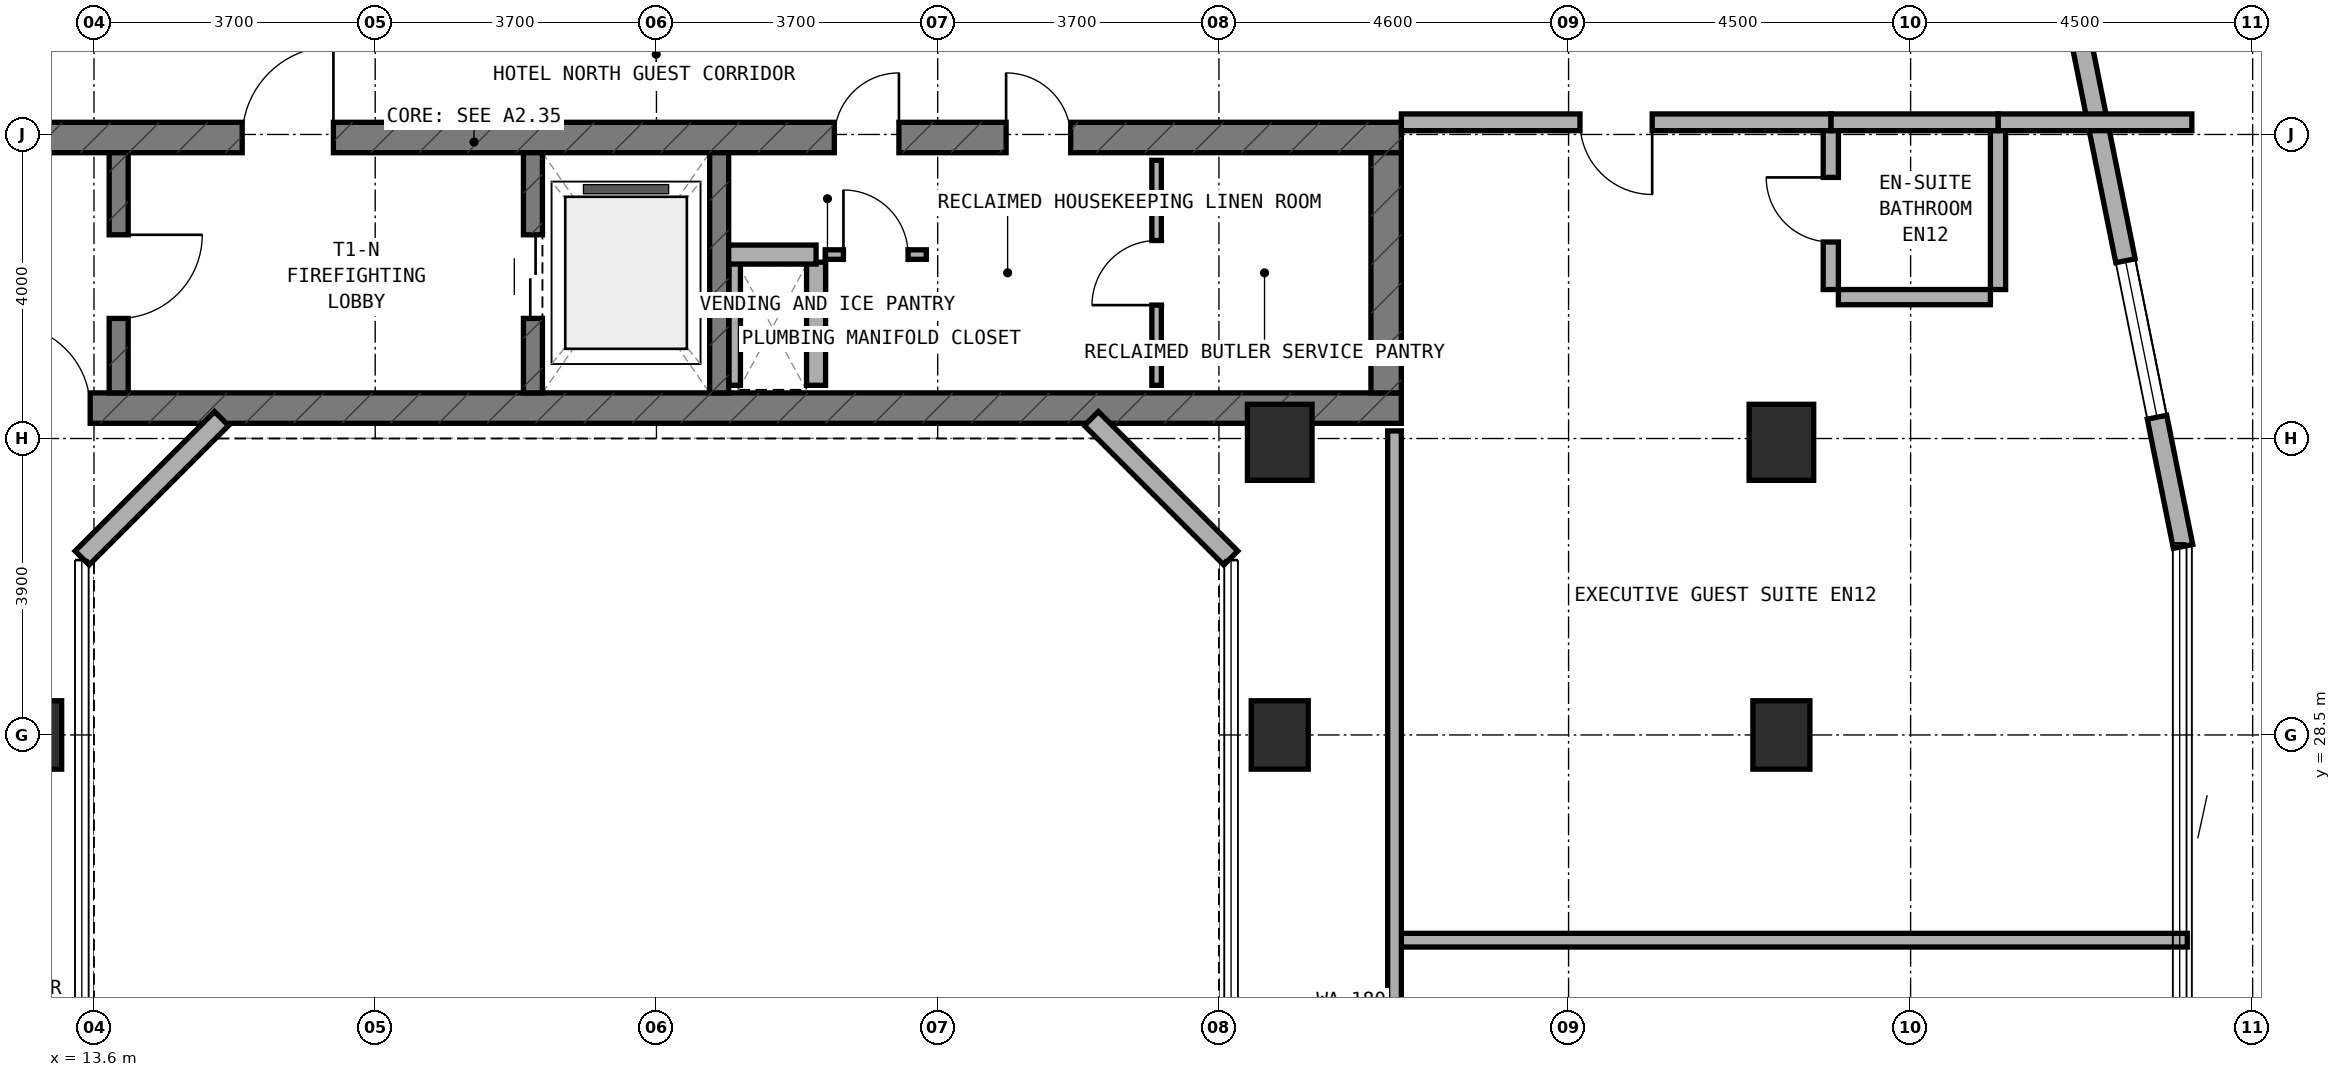
"""IFC4 building model, lengths in metres.
Left out: names, types, materials, properties, quantities, classifications, styles, units other than length and angle.
Written with IfcOpenShell. Run it as: python <this file> out.ifc"""

import sys

from ifc_helpers import new_model, si_unit, direction, frame, frame_2d, origin, origin_2d, place, context, subcontext, project, spatial, rectangle, extrude, element, fill, save


model = new_model("IFC4")
c1 = context("Model", 3, precision=1e-05, world=origin(), true_north=direction((0.0, 1.0)))
c2 = subcontext(c1, "Body", "Model", "MODEL_VIEW")
j1 = project(units=[si_unit("LENGTHUNIT", "METRE"), si_unit("PLANEANGLEUNIT", "RADIAN")], contexts=[c1])
p1 = place(None, origin())
s1 = spatial("IfcSite", under=j1, at=p1, CompositionType="ELEMENT")
p2 = place(p1, origin())
s2 = spatial("IfcBuilding", under=s1, at=p2, CompositionType="ELEMENT")
p3 = place(p2, frame((0.0, 0.0, 155.5)))
s3 = spatial("IfcBuildingStorey", under=s2, at=p3, CompositionType="ELEMENT", Elevation=155.5)
p4 = place(p3, frame((6.4, 32.8, 0.0), z_axis=(0.0, 0.0, 1.0), x_axis=(1.0, 0.0, 0.0)))
e1 = element("IfcWall", 1, at=p4, inside=s3, PredefinedType="SHEAR", context=c2, shape_type="SweptSolid", body=[
    extrude(rectangle(XDim=24.4, YDim=0.4, at=frame_2d((12.2, 0.0))), origin(), (0.0, 0.0, 1.0), 3.5),
])
p5 = place(p4, frame((6.05, 0.0, 0.0)))
e2 = element("IfcOpeningElement", 2, at=p5, cuts=e1, PredefinedType="OPENING", context=c2, shape_type="SweptSolid", body=[
    extrude(rectangle(XDim=1.1, YDim=2.15, at=frame_2d((0.55, 1.075))), frame((0.0, 0.21, 0.0), z_axis=(0.0, -1.0, 0.0), x_axis=(1.0, 0.0, 0.0)), (0.0, 0.0, 1.0), 0.42),
])
p6 = place(p3, frame((6.4, 36.36, 0.0), z_axis=(0.0, 0.0, 1.0), x_axis=(1.0, 0.0, 0.0)))
e3 = element("IfcWall", 3, at=p6, inside=s3, PredefinedType="SHEAR", context=c2, shape_type="SweptSolid", body=[
    extrude(rectangle(XDim=24.4, YDim=0.4, at=frame_2d((12.2, 0.0))), origin(), (0.0, 0.0, 1.0), 3.5),
])
p7 = place(p6, frame((9.15, 0.0, 0.0)))
e4 = element("IfcOpeningElement", 4, at=p7, cuts=e3, PredefinedType="OPENING", context=c2, shape_type="SweptSolid", body=[
    extrude(rectangle(XDim=1.2, YDim=2.15, at=frame_2d((0.6, 1.075))), frame((0.0, 0.21, 0.0), z_axis=(0.0, -1.0, 0.0), x_axis=(1.0, 0.0, 0.0)), (0.0, 0.0, 1.0), 0.42),
])
p8 = place(p6, frame((19.2, 0.0, 0.0)))
e5 = element("IfcOpeningElement", 5, at=p8, cuts=e3, PredefinedType="OPENING", context=c2, shape_type="SweptSolid", body=[
    extrude(rectangle(XDim=0.85, YDim=2.1, at=frame_2d((0.425, 1.05))), frame((0.0, 0.21, 0.0), z_axis=(0.0, -1.0, 0.0), x_axis=(1.0, 0.0, 0.0)), (0.0, 0.0, 1.0), 0.42),
])
p9 = place(p6, frame((16.94, 0.0, 0.0)))
e6 = element("IfcOpeningElement", 6, at=p9, cuts=e3, PredefinedType="OPENING", context=c2, shape_type="SweptSolid", body=[
    extrude(rectangle(XDim=0.85, YDim=2.1, at=frame_2d((0.425, 1.05))), frame((0.0, 0.21, 0.0), z_axis=(0.0, -1.0, 0.0), x_axis=(1.0, 0.0, 0.0)), (0.0, 0.0, 1.0), 0.42),
])
p10 = place(p3, frame((30.6, 33.0, 0.0), z_axis=(0.0, 0.0, 1.0), x_axis=(0.0, 1.0, 0.0)))
e7 = element("IfcWall", 7, at=p10, inside=s3, PredefinedType="SHEAR", context=c2, shape_type="SweptSolid", body=[
    extrude(rectangle(XDim=3.16, YDim=0.4, at=frame_2d((1.58, 0.0))), origin(), (0.0, 0.0, 1.0), 3.5),
])
p11 = place(p3, frame((13.925, 33.0, 0.0), z_axis=(0.0, 0.0, 1.0), x_axis=(0.0, 1.0, 0.0)))
e8 = element("IfcWall", 8, at=p11, inside=s3, PredefinedType="STANDARD", context=c2, shape_type="SweptSolid", body=[
    extrude(rectangle(XDim=3.16, YDim=0.25, at=frame_2d((1.58, 0.0))), origin(), (0.0, 0.0, 1.0), 3.22),
])
p12 = place(p11, frame((0.98, 0.0, 0.0)))
e9 = element("IfcOpeningElement", 9, at=p12, cuts=e8, PredefinedType="OPENING", context=c2, shape_type="SweptSolid", body=[
    extrude(rectangle(XDim=1.1, YDim=2.15, at=frame_2d((0.55, 1.075))), frame((0.0, 0.135, 0.0), z_axis=(0.0, -1.0, 0.0), x_axis=(1.0, 0.0, 0.0)), (0.0, 0.0, 1.0), 0.27),
])
p13 = place(p3, frame((19.375, 33.0, 0.0), z_axis=(0.0, 0.0, 1.0), x_axis=(0.0, 1.0, 0.0)))
e10 = element("IfcWall", 10, at=p13, inside=s3, PredefinedType="STANDARD", context=c2, shape_type="SweptSolid", body=[
    extrude(rectangle(XDim=3.16, YDim=0.25, at=frame_2d((1.58, 0.0))), origin(), (0.0, 0.0, 1.0), 3.22),
])
p14 = place(p13, frame((0.98, 0.0, 0.0)))
e11 = element("IfcOpeningElement", 11, at=p14, cuts=e10, PredefinedType="OPENING", context=c2, shape_type="SweptSolid", body=[
    extrude(rectangle(XDim=1.1, YDim=2.15, at=frame_2d((0.55, 1.075))), frame((0.0, 0.135, 0.0), z_axis=(0.0, -1.0, 0.0), x_axis=(1.0, 0.0, 0.0)), (0.0, 0.0, 1.0), 0.27),
])
p15 = place(p3, frame((21.825, 33.0, 0.0), z_axis=(0.0, 0.0, 1.0), x_axis=(0.0, 1.0, 0.0)))
e12 = element("IfcWall", 12, at=p15, inside=s3, PredefinedType="STANDARD", context=c2, shape_type="SweptSolid", body=[
    extrude(rectangle(XDim=3.16, YDim=0.25, at=frame_2d((1.58, 0.0))), origin(), (0.0, 0.0, 1.0), 3.22),
])
p16 = place(p3, frame((35.8, 28.5, 0.0), z_axis=(0.0, 0.0, 1.0), x_axis=(1.0, 0.0, 0.0)))
e13 = element("IfcColumn", 13, at=p16, inside=s3, PredefinedType="COLUMN", context=c2, shape_type="SweptSolid", body=[
    extrude(rectangle(XDim=0.75, YDim=0.9, at=origin_2d()), origin(), (0.0, 0.0, 1.0), 3.5),
])
p17 = place(p3, frame((35.8, 32.35, 0.0), z_axis=(0.0, 0.0, 1.0), x_axis=(1.0, 0.0, 0.0)))
e14 = element("IfcColumn", 14, at=p17, inside=s3, PredefinedType="COLUMN", context=c2, shape_type="SweptSolid", body=[
    extrude(rectangle(XDim=0.85, YDim=1.0, at=origin_2d()), origin(), (0.0, 0.0, 1.0), 3.5),
])
p18 = place(p3, frame((12.8, 28.5, 0.0), z_axis=(0.0, 0.0, 1.0), x_axis=(1.0, 0.0, 0.0)))
e15 = element("IfcColumn", 15, at=p18, inside=s3, PredefinedType="COLUMN", context=c2, shape_type="SweptSolid", body=[
    extrude(rectangle(XDim=0.75, YDim=0.9, at=origin_2d()), origin(), (0.0, 0.0, 1.0), 3.5),
])
p19 = place(p3, frame((29.2, 32.35, 0.0), z_axis=(0.0, 0.0, 1.0), x_axis=(1.0, 0.0, 0.0)))
e16 = element("IfcColumn", 16, at=p19, inside=s3, PredefinedType="COLUMN", context=c2, shape_type="SweptSolid", body=[
    extrude(rectangle(XDim=0.85, YDim=1.0, at=origin_2d()), origin(), (0.0, 0.0, 1.0), 3.5),
])
p20 = place(p3, frame((29.2, 28.5, 0.0), z_axis=(0.0, 0.0, 1.0), x_axis=(1.0, 0.0, 0.0)))
e17 = element("IfcColumn", 17, at=p20, inside=s3, PredefinedType="COLUMN", context=c2, shape_type="SweptSolid", body=[
    extrude(rectangle(XDim=0.75, YDim=0.9, at=origin_2d()), origin(), (0.0, 0.0, 1.0), 3.5),
])
p21 = place(p3, frame((41.084, 30.98, 0.0), z_axis=(0.0, 0.0, 1.0), x_axis=(-0.197435082048, 0.980315963543, 0.0)))
e18 = element("IfcWall", 18, at=p21, inside=s3, PredefinedType="STANDARD", context=c2, shape_type="SweptSolid", body=[
    extrude(rectangle(XDim=9.183, YDim=0.26, at=frame_2d((4.591, 0.0))), origin(), (0.0, 0.0, 1.0), 3.22),
])
p22 = place(p21, frame((1.734, 0.0, 0.85)))
e19 = element("IfcOpeningElement", 19, at=p22, cuts=e18, PredefinedType="OPENING", context=c2, shape_type="SweptSolid", body=[
    extrude(rectangle(XDim=2.1, YDim=1.5, at=frame_2d((1.05, 0.75))), frame((0.0, 0.14, 0.0), z_axis=(0.0, -1.0, 0.0), x_axis=(1.0, 0.0, 0.0)), (0.0, 0.0, 1.0), 0.28),
])
for number, where, z_axis, x_axis in (
    (20, (28.556, 30.828, 0.0), (0.0, 0.0, 1.0), (-0.707, 0.707, 0.0)),
    (21, (15.278, 32.662, 0.0), (0.0, 0.0, 1.0), (-0.707, -0.707, 0.0)),
):
    element("IfcWall", number, at=place(p3, frame(where, z_axis=z_axis, x_axis=x_axis)), inside=s3, PredefinedType="STANDARD", context=c2, shape_type="SweptSolid", body=[
        extrude(rectangle(XDim=2.594, YDim=0.26, at=frame_2d((1.297, 0.0))), origin(), (0.0, 0.0, 1.0), 3.22),
    ])
p23 = place(p3, frame((27.58, 33.1, 0.0), z_axis=(0.0, 0.0, 1.0), x_axis=(0.0, 1.0, 0.0)))
e22 = element("IfcWall", 22, at=p23, inside=s3, PredefinedType="PARTITIONING", context=c2, shape_type="SweptSolid", body=[
    extrude(rectangle(XDim=2.96, YDim=0.125, at=frame_2d((1.48, 0.0))), origin(), (0.0, 0.0, 1.0), 2.795),
])
p24 = place(p23, frame((1.055, 0.0, 0.0)))
e23 = element("IfcOpeningElement", 23, at=p24, cuts=e22, PredefinedType="OPENING", context=c2, shape_type="SweptSolid", body=[
    extrude(rectangle(XDim=0.85, YDim=2.1, at=frame_2d((0.425, 1.05))), frame((0.0, 0.073, 0.0), z_axis=(0.0, -1.0, 0.0), x_axis=(1.0, 0.0, 0.0)), (0.0, 0.0, 1.0), 0.145),
])
p25 = place(p3, frame((22.03, 33.1, 0.0), z_axis=(0.0, 0.0, 1.0), x_axis=(0.0, 1.0, 0.0)))
e24 = element("IfcWall", 24, at=p25, inside=s3, PredefinedType="PARTITIONING", context=c2, shape_type="SweptSolid", body=[
    extrude(rectangle(XDim=1.62, YDim=0.15, at=frame_2d((0.81, 0.0))), origin(), (0.0, 0.0, 1.0), 3.22),
])
p26 = place(p3, frame((23.1, 33.1, 0.0), z_axis=(0.0, 0.0, 1.0), x_axis=(0.0, 1.0, 0.0)))
e25 = element("IfcWall", 25, at=p26, inside=s3, PredefinedType="SOLIDWALL", context=c2, shape_type="SweptSolid", body=[
    extrude(rectangle(XDim=1.62, YDim=0.25, at=frame_2d((0.81, 0.0))), origin(), (0.0, 0.0, 1.0), 3.22),
])
p27 = place(p3, frame((21.95, 34.82, 0.0), z_axis=(0.0, 0.0, 1.0), x_axis=(1.0, 0.0, 0.0)))
e26 = element("IfcWall", 26, at=p27, inside=s3, PredefinedType="SOLIDWALL", context=c2, shape_type="SweptSolid", body=[
    extrude(rectangle(XDim=1.15, YDim=0.25, at=frame_2d((0.575, 0.0))), origin(), (0.0, 0.0, 1.0), 3.22),
])
p28 = place(p3, frame((23.22, 34.82, 0.0), z_axis=(0.0, 0.0, 1.0), x_axis=(1.0, 0.0, 0.0)))
e27 = element("IfcWall", 27, at=p28, inside=s3, PredefinedType="PARTITIONING", context=c2, shape_type="SweptSolid", body=[
    extrude(rectangle(XDim=1.33, YDim=0.125, at=frame_2d((0.665, 0.0))), origin(), (0.0, 0.0, 1.0), 3.22),
])
p29 = place(p28, frame((0.24, 0.0, 0.0)))
e28 = element("IfcOpeningElement", 28, at=p29, cuts=e27, PredefinedType="OPENING", context=c2, shape_type="SweptSolid", body=[
    extrude(rectangle(XDim=0.85, YDim=2.1, at=frame_2d((0.425, 1.05))), frame((0.0, 0.073, 0.0), z_axis=(0.0, -1.0, 0.0), x_axis=(1.0, 0.0, 0.0)), (0.0, 0.0, 1.0), 0.145),
])
p30 = place(p3, frame((30.8, 25.8, 0.0), z_axis=(0.0, 0.0, 1.0), x_axis=(1.0, 0.0, 0.0)))
e29 = element("IfcWall", 29, at=p30, inside=s3, PredefinedType="SOLIDWALL", context=c2, shape_type="SweptSolid", body=[
    extrude(rectangle(XDim=10.34, YDim=0.18, at=frame_2d((5.17, 0.0))), origin(), (0.0, 0.0, 1.0), 2.835),
])
p31 = place(p3, frame((30.71, 17.5, 0.0), z_axis=(0.0, 0.0, 1.0), x_axis=(0.0, 1.0, 0.0)))
e30 = element("IfcWall", 30, at=p31, inside=s3, PredefinedType="SOLIDWALL", context=c2, shape_type="SweptSolid", body=[
    extrude(rectangle(XDim=15.0, YDim=0.18, at=frame_2d((7.5, 0.0))), origin(), (0.0, 0.0, 1.0), 2.795),
])
p32 = place(p3, frame((36.45, 34.36, 0.0), z_axis=(0.0, 0.0, 1.0), x_axis=(0.0, 1.0, 0.0)))
e31 = element("IfcWall", 31, at=p32, inside=s3, PredefinedType="PLUMBINGWALL", context=c2, shape_type="SweptSolid", body=[
    extrude(rectangle(XDim=2.1, YDim=0.2, at=frame_2d((1.05, 0.0))), origin(), (0.0, 0.0, 1.0), 3.22),
])
p33 = place(p32, frame((0.625, 0.0, 0.0)))
e32 = element("IfcOpeningElement", 32, at=p33, cuts=e31, PredefinedType="OPENING", context=c2, shape_type="SweptSolid", body=[
    extrude(rectangle(XDim=0.85, YDim=2.1, at=frame_2d((0.425, 1.05))), frame((0.0, 0.11, 0.0), z_axis=(0.0, -1.0, 0.0), x_axis=(1.0, 0.0, 0.0)), (0.0, 0.0, 1.0), 0.22),
])
p34 = place(p3, frame((36.55, 34.26, 0.0), z_axis=(0.0, 0.0, 1.0), x_axis=(1.0, 0.0, 0.0)))
e33 = element("IfcWall", 33, at=p34, inside=s3, PredefinedType="PLUMBINGWALL", context=c2, shape_type="SweptSolid", body=[
    extrude(rectangle(XDim=2.0, YDim=0.2, at=frame_2d((1.0, 0.0))), origin(), (0.0, 0.0, 1.0), 3.22),
])
p35 = place(p3, frame((38.65, 34.36, 0.0), z_axis=(0.0, 0.0, 1.0), x_axis=(0.0, 1.0, 0.0)))
e34 = element("IfcWall", 34, at=p35, inside=s3, PredefinedType="PLUMBINGWALL", context=c2, shape_type="SweptSolid", body=[
    extrude(rectangle(XDim=2.1, YDim=0.2, at=frame_2d((1.05, 0.0))), origin(), (0.0, 0.0, 1.0), 3.22),
])
p36 = place(p3, frame((38.65, 36.56, 0.0), z_axis=(0.0, 0.0, 1.0), x_axis=(1.0, 0.0, 0.0)))
e35 = element("IfcWall", 35, at=p36, inside=s3, PredefinedType="SOLIDWALL", context=c2, shape_type="SweptSolid", body=[
    extrude(rectangle(XDim=2.55, YDim=0.22, at=frame_2d((1.275, 0.0))), origin(), (0.0, 0.0, 1.0), 3.22),
])
p37 = place(p3, frame((36.45, 36.56, 0.0), z_axis=(0.0, 0.0, 1.0), x_axis=(1.0, 0.0, 0.0)))
e36 = element("IfcWall", 36, at=p37, inside=s3, PredefinedType="SOLIDWALL", context=c2, shape_type="SweptSolid", body=[
    extrude(rectangle(XDim=2.2, YDim=0.22, at=frame_2d((1.1, 0.0))), origin(), (0.0, 0.0, 1.0), 3.22),
])
p38 = place(p3, frame((30.8, 36.56, 0.0), z_axis=(0.0, 0.0, 1.0), x_axis=(1.0, 0.0, 0.0)))
e37 = element("IfcWall", 37, at=p38, inside=s3, PredefinedType="SOLIDWALL", context=c2, shape_type="SweptSolid", body=[
    extrude(rectangle(XDim=5.65, YDim=0.22, at=frame_2d((2.825, 0.0))), origin(), (0.0, 0.0, 1.0), 2.795),
])
p39 = place(p38, frame((2.35, 0.0, 0.0)))
e38 = element("IfcOpeningElement", 38, at=p39, cuts=e37, PredefinedType="OPENING", context=c2, shape_type="SweptSolid", body=[
    extrude(rectangle(XDim=0.95, YDim=2.1, at=frame_2d((0.475, 1.05))), frame((0.0, 0.12, 0.0), z_axis=(0.0, -1.0, 0.0), x_axis=(1.0, 0.0, 0.0)), (0.0, 0.0, 1.0), 0.24),
])
p40 = place(p22, origin())
e39 = element("IfcWindow", 39, at=p40, inside=s3, PartitioningType="SINGLE_PANEL", PredefinedType="WINDOW", context=c2, shape_type="SweptSolid", body=[
    extrude(rectangle(XDim=2.1, YDim=1.5, at=frame_2d((1.05, 0.75))), frame((0.0, 0.03, 0.0), z_axis=(0.0, -1.0, 0.0), x_axis=(1.0, 0.0, 0.0)), (0.0, 0.0, 1.0), 0.06),
])
fill(e19, e39)
p41 = place(p12, frame((1.1, 0.0, 0.0), z_axis=(0.0, 0.0, 1.0), x_axis=(-1.0, 0.0, 0.0)))
e40 = element("IfcDoor", 40, at=p41, inside=s3, OperationType="SINGLE_SWING_LEFT", PredefinedType="DOOR", context=c2, shape_type="SweptSolid", body=[
    extrude(rectangle(XDim=1.1, YDim=2.15, at=frame_2d((0.55, 1.075))), frame((0.0, 0.025, 0.0), z_axis=(0.0, -1.0, 0.0), x_axis=(1.0, 0.0, 0.0)), (0.0, 0.0, 1.0), 0.05),
])
fill(e9, e40)
p42 = place(p7, origin())
e41 = element("IfcDoor", 41, at=p42, inside=s3, OperationType="SINGLE_SWING_RIGHT", PredefinedType="DOOR", context=c2, shape_type="SweptSolid", body=[
    extrude(rectangle(XDim=1.2, YDim=2.15, at=frame_2d((0.6, 1.075))), frame((0.0, 0.025, 0.0), z_axis=(0.0, -1.0, 0.0), x_axis=(1.0, 0.0, 0.0)), (0.0, 0.0, 1.0), 0.05),
])
fill(e4, e41)
p43 = place(p14, origin())
e42 = element("IfcDoor", 42, at=p43, inside=s3, OperationType="DOUBLE_DOOR_SLIDING", PredefinedType="DOOR", context=c2, shape_type="SweptSolid", body=[
    extrude(rectangle(XDim=1.1, YDim=2.15, at=frame_2d((0.55, 1.075))), frame((0.0, 0.025, 0.0), z_axis=(0.0, -1.0, 0.0), x_axis=(1.0, 0.0, 0.0)), (0.0, 0.0, 1.0), 0.05),
])
fill(e11, e42)
p44 = place(p8, origin())
e43 = element("IfcDoor", 43, at=p44, inside=s3, OperationType="SINGLE_SWING_LEFT", PredefinedType="DOOR", context=c2, shape_type="SweptSolid", body=[
    extrude(rectangle(XDim=0.85, YDim=2.1, at=frame_2d((0.425, 1.05))), frame((0.0, 0.025, 0.0), z_axis=(0.0, -1.0, 0.0), x_axis=(1.0, 0.0, 0.0)), (0.0, 0.0, 1.0), 0.05),
])
fill(e5, e43)
p45 = place(p9, origin())
e44 = element("IfcDoor", 44, at=p45, inside=s3, OperationType="SINGLE_SWING_RIGHT", PredefinedType="DOOR", context=c2, shape_type="SweptSolid", body=[
    extrude(rectangle(XDim=0.85, YDim=2.1, at=frame_2d((0.425, 1.05))), frame((0.0, 0.025, 0.0), z_axis=(0.0, -1.0, 0.0), x_axis=(1.0, 0.0, 0.0)), (0.0, 0.0, 1.0), 0.05),
])
fill(e6, e44)
p46 = place(p5, origin())
e45 = element("IfcDoor", 45, at=p46, inside=s3, OperationType="SINGLE_SWING_LEFT", PredefinedType="DOOR", context=c2, shape_type="SweptSolid", body=[
    extrude(rectangle(XDim=1.1, YDim=2.15, at=frame_2d((0.55, 1.075))), frame((0.0, 0.025, 0.0), z_axis=(0.0, -1.0, 0.0), x_axis=(1.0, 0.0, 0.0)), (0.0, 0.0, 1.0), 0.05),
])
fill(e2, e45)
p47 = place(p24, origin())
e46 = element("IfcDoor", 46, at=p47, inside=s3, OperationType="SINGLE_SWING_LEFT", PredefinedType="DOOR", context=c2, shape_type="SweptSolid", body=[
    extrude(rectangle(XDim=0.85, YDim=2.1, at=frame_2d((0.425, 1.05))), frame((0.0, 0.025, 0.0), z_axis=(0.0, -1.0, 0.0), x_axis=(1.0, 0.0, 0.0)), (0.0, 0.0, 1.0), 0.05),
])
fill(e23, e46)
p48 = place(p29, origin())
e47 = element("IfcDoor", 47, at=p48, inside=s3, OperationType="SINGLE_SWING_LEFT", PredefinedType="DOOR", context=c2, shape_type="SweptSolid", body=[
    extrude(rectangle(XDim=0.85, YDim=2.1, at=frame_2d((0.425, 1.05))), frame((0.0, 0.025, 0.0), z_axis=(0.0, -1.0, 0.0), x_axis=(1.0, 0.0, 0.0)), (0.0, 0.0, 1.0), 0.05),
])
fill(e28, e47)
p49 = place(p33, origin())
e48 = element("IfcDoor", 48, at=p49, inside=s3, OperationType="SINGLE_SWING_RIGHT", PredefinedType="DOOR", context=c2, shape_type="SweptSolid", body=[
    extrude(rectangle(XDim=0.85, YDim=2.1, at=frame_2d((0.425, 1.05))), frame((0.0, 0.025, 0.0), z_axis=(0.0, -1.0, 0.0), x_axis=(1.0, 0.0, 0.0)), (0.0, 0.0, 1.0), 0.05),
])
fill(e32, e48)
p50 = place(p39, frame((0.95, 0.0, 0.0), z_axis=(0.0, 0.0, 1.0), x_axis=(-1.0, 0.0, 0.0)))
e49 = element("IfcDoor", 49, at=p50, inside=s3, OperationType="SINGLE_SWING_LEFT", PredefinedType="DOOR", context=c2, shape_type="SweptSolid", body=[
    extrude(rectangle(XDim=0.95, YDim=2.1, at=frame_2d((0.475, 1.05))), frame((0.0, 0.025, 0.0), z_axis=(0.0, -1.0, 0.0), x_axis=(1.0, 0.0, 0.0)), (0.0, 0.0, 1.0), 0.05),
])
fill(e38, e49)
save(model, sys.argv[1])
